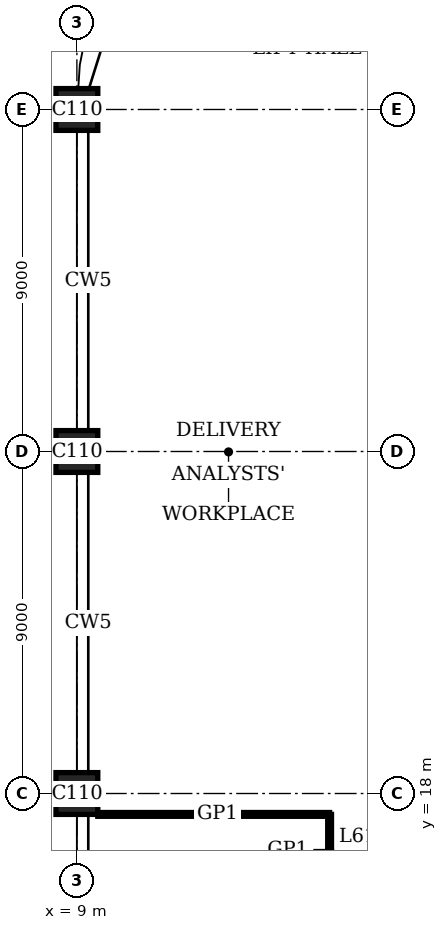
"""IFC4 building model, lengths in metres.
Left out: names, types, materials, properties, quantities, classifications, styles, units other than length and angle.
Written with IfcOpenShell. Run it as: python <this file> out.ifc"""

import sys

from ifc_helpers import new_model, si_unit, direction, frame, frame_2d, origin, origin_2d, place, context, subcontext, project, spatial, rectangle, extrude, element, save


model = new_model("IFC4")
c1 = context("Model", 3, precision=1e-05, world=origin(), true_north=direction((0.0, 1.0)))
c2 = subcontext(c1, "Body", "Model", "MODEL_VIEW")
j1 = project(units=[si_unit("LENGTHUNIT", "METRE"), si_unit("PLANEANGLEUNIT", "RADIAN")], contexts=[c1])
p1 = place(None, origin())
s1 = spatial("IfcSite", under=j1, at=p1, CompositionType="ELEMENT")
p2 = place(p1, origin())
s2 = spatial("IfcBuilding", under=s1, at=p2, CompositionType="ELEMENT")
p3 = place(p2, frame((0.0, 0.0, 251.4)))
s3 = spatial("IfcBuildingStorey", under=s2, at=p3, CompositionType="ELEMENT", Elevation=251.4)
for number, where, z_axis, x_axis in (
    (1, (9.0, 18.0, 0.0), (0.0, 0.0, 1.0), (1.0, 0.0, 0.0)),
    (2, (9.0, 27.0, 0.0), (0.0, 0.0, 1.0), (1.0, 0.0, 0.0)),
    (3, (9.0, 36.0, 0.0), (0.0, 0.0, 1.0), (1.0, 0.0, 0.0)),
):
    element("IfcColumn", number, at=place(p3, frame(where, z_axis=z_axis, x_axis=x_axis)), inside=s3, PredefinedType="COLUMN", context=c2, shape_type="SweptSolid", body=[
        extrude(rectangle(XDim=1.1, YDim=1.1, at=origin_2d()), origin(), (0.0, 0.0, 1.0), 4.0),
    ])
p4 = place(p3, frame((9.55, 17.45, 0.0), z_axis=(0.0, 0.0, 1.0), x_axis=(1.0, 0.0, 0.0)))
e4 = element("IfcWall", 4, at=p4, inside=s3, PredefinedType="PARTITIONING", context=c2, shape_type="SweptSolid", body=[
    extrude(rectangle(XDim=6.1, YDim=0.1, at=frame_2d((3.05, 0.0))), origin(), (0.0, 0.0, 1.0), 3.75),
])
p5 = place(p3, frame((15.65, 15.6, 0.0), z_axis=(0.0, 0.0, 1.0), x_axis=(0.0, 1.0, 0.0)))
e5 = element("IfcWall", 5, at=p5, inside=s3, PredefinedType="PARTITIONING", context=c2, shape_type="SweptSolid", body=[
    extrude(rectangle(XDim=1.85, YDim=0.1, at=frame_2d((0.925, 0.0))), origin(), (0.0, 0.0, 1.0), 3.75),
])
save(model, sys.argv[1])
